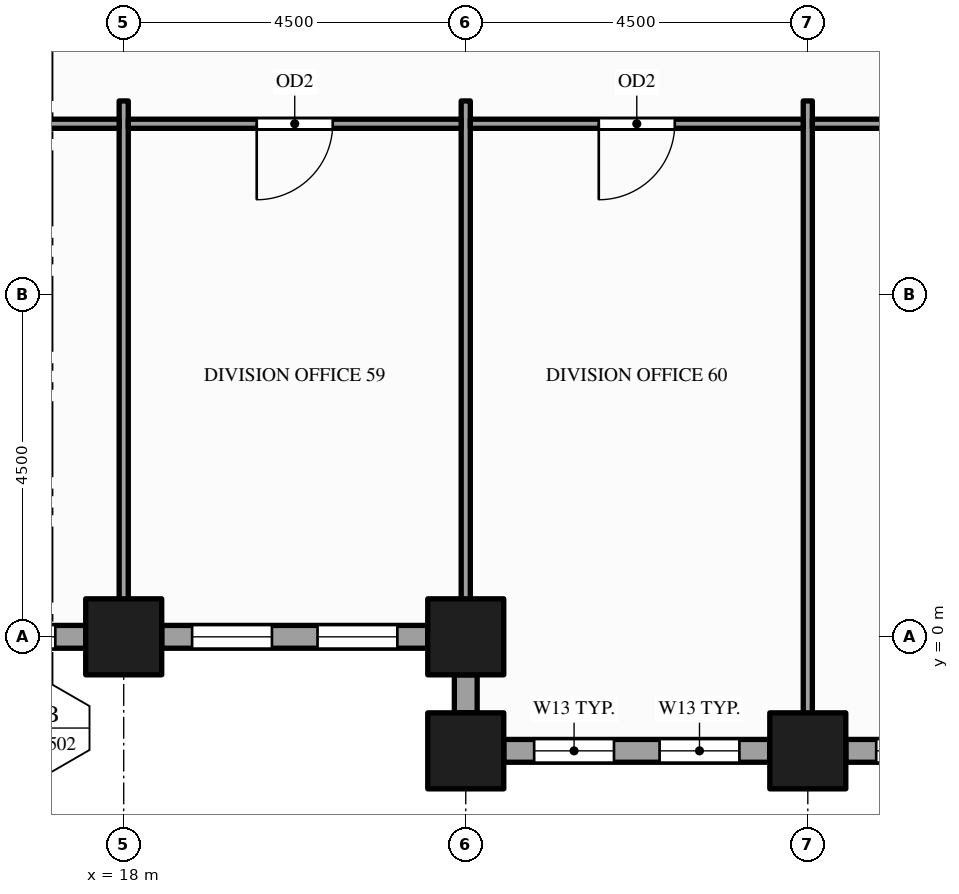
"""IFC4 building model, lengths in metres.
Left out: names, types, materials, properties, quantities, classifications, styles, units other than length and angle.
Written with IfcOpenShell. Run it as: python <this file> out.ifc"""

import sys

from ifc_helpers import new_model, si_unit, direction, frame, frame_2d, origin, origin_2d, place, context, subcontext, project, spatial, rectangle, hollow_rectangle, extrude, element, fill, save


model = new_model("IFC4")
c1 = context("Model", 3, precision=1e-05, world=origin(), true_north=direction((0.0, 1.0)))
c2 = subcontext(c1, "Body", "Model", "MODEL_VIEW")
j1 = project(units=[si_unit("LENGTHUNIT", "METRE"), si_unit("PLANEANGLEUNIT", "RADIAN")], contexts=[c1])
p1 = place(None, origin())
s1 = spatial("IfcSite", under=j1, at=p1, CompositionType="ELEMENT")
p2 = place(p1, origin())
s2 = spatial("IfcBuilding", under=s1, at=p2, CompositionType="ELEMENT")
p3 = place(p2, frame((0.0, 0.0, 103.0)))
s3 = spatial("IfcBuildingStorey", under=s2, at=p3, CompositionType="ELEMENT", Elevation=103.0)
for number, where, z_axis, x_axis in (
    (1, (18.0, 0.0, -0.15), (0.0, 0.0, 1.0), (1.0, 0.0, 0.0)),
    (2, (22.5, -1.5, -0.15), (0.0, 0.0, 1.0), (1.0, 0.0, 0.0)),
    (3, (22.5, 0.0, -0.15), (0.0, 0.0, 1.0), (1.0, 0.0, 0.0)),
    (4, (27.0, -1.5, -0.15), (0.0, 0.0, 1.0), (1.0, 0.0, 0.0)),
):
    element("IfcColumn", number, at=place(p3, frame(where, z_axis=z_axis, x_axis=x_axis)), inside=s3, PredefinedType="COLUMN", context=c2, shape_type="SweptSolid", body=[
        extrude(hollow_rectangle(XDim=1.0, YDim=1.0, WallThickness=0.05, at=origin_2d()), origin(), (0.0, 0.0, 1.0), 4.0),
    ])
p4 = place(p3, frame((23.0, -1.5, 0.0), z_axis=(0.0, 0.0, 1.0), x_axis=(1.0, 0.0, 0.0)))
e5 = element("IfcWall", 5, at=p4, inside=s3, PredefinedType="STANDARD", context=c2, shape_type="SweptSolid", body=[
    extrude(rectangle(XDim=3.5, YDim=0.3, at=frame_2d((1.75, 0.0))), origin(), (0.0, 0.0, 1.0), 3.154),
])
p5 = place(p4, frame((0.4, 0.0, 0.9)))
e6 = element("IfcOpeningElement", 6, at=p5, cuts=e5, PredefinedType="OPENING", context=c2, shape_type="SweptSolid", body=[
    extrude(rectangle(XDim=1.05, YDim=2.0, at=frame_2d((0.525, 1.0))), frame((0.0, 0.16, 0.0), z_axis=(0.0, -1.0, 0.0), x_axis=(1.0, 0.0, 0.0)), (0.0, 0.0, 1.0), 0.32),
])
p6 = place(p4, frame((2.05, 0.0, 0.9)))
e7 = element("IfcOpeningElement", 7, at=p6, cuts=e5, PredefinedType="OPENING", context=c2, shape_type="SweptSolid", body=[
    extrude(rectangle(XDim=1.05, YDim=2.0, at=frame_2d((0.525, 1.0))), frame((0.0, 0.16, 0.0), z_axis=(0.0, -1.0, 0.0), x_axis=(1.0, 0.0, 0.0)), (0.0, 0.0, 1.0), 0.32),
])
p7 = place(p3, frame((27.5, -1.5, 0.0), z_axis=(0.0, 0.0, 1.0), x_axis=(1.0, 0.0, 0.0)))
e8 = element("IfcWall", 8, at=p7, inside=s3, PredefinedType="STANDARD", context=c2, shape_type="SweptSolid", body=[
    extrude(rectangle(XDim=3.5, YDim=0.3, at=frame_2d((1.75, 0.0))), origin(), (0.0, 0.0, 1.0), 3.154),
])
p8 = place(p7, frame((0.4, 0.0, 0.9)))
e9 = element("IfcOpeningElement", 9, at=p8, cuts=e8, PredefinedType="OPENING", context=c2, shape_type="SweptSolid", body=[
    extrude(rectangle(XDim=1.05, YDim=2.0, at=frame_2d((0.525, 1.0))), frame((0.0, 0.16, 0.0), z_axis=(0.0, -1.0, 0.0), x_axis=(1.0, 0.0, 0.0)), (0.0, 0.0, 1.0), 0.32),
])
p9 = place(p7, frame((2.05, 0.0, 0.9)))
e10 = element("IfcOpeningElement", 10, at=p9, cuts=e8, PredefinedType="OPENING", context=c2, shape_type="SweptSolid", body=[
    extrude(rectangle(XDim=1.05, YDim=2.0, at=frame_2d((0.525, 1.0))), frame((0.0, 0.16, 0.0), z_axis=(0.0, -1.0, 0.0), x_axis=(1.0, 0.0, 0.0)), (0.0, 0.0, 1.0), 0.32),
])
p10 = place(p3, frame((14.0, 0.0, 0.0), z_axis=(0.0, 0.0, 1.0), x_axis=(1.0, 0.0, 0.0)))
e11 = element("IfcWall", 11, at=p10, inside=s3, PredefinedType="STANDARD", context=c2, shape_type="SweptSolid", body=[
    extrude(rectangle(XDim=3.5, YDim=0.3, at=frame_2d((1.75, 0.0))), origin(), (0.0, 0.0, 1.0), 3.154),
])
p11 = place(p10, frame((0.4, 0.0, 0.9)))
e12 = element("IfcOpeningElement", 12, at=p11, cuts=e11, PredefinedType="OPENING", context=c2, shape_type="SweptSolid", body=[
    extrude(rectangle(XDim=1.05, YDim=2.0, at=frame_2d((0.525, 1.0))), frame((0.0, 0.16, 0.0), z_axis=(0.0, -1.0, 0.0), x_axis=(1.0, 0.0, 0.0)), (0.0, 0.0, 1.0), 0.32),
])
p12 = place(p10, frame((2.05, 0.0, 0.9)))
e13 = element("IfcOpeningElement", 13, at=p12, cuts=e11, PredefinedType="OPENING", context=c2, shape_type="SweptSolid", body=[
    extrude(rectangle(XDim=1.05, YDim=2.0, at=frame_2d((0.525, 1.0))), frame((0.0, 0.16, 0.0), z_axis=(0.0, -1.0, 0.0), x_axis=(1.0, 0.0, 0.0)), (0.0, 0.0, 1.0), 0.32),
])
p13 = place(p3, frame((18.5, 0.0, 0.0), z_axis=(0.0, 0.0, 1.0), x_axis=(1.0, 0.0, 0.0)))
e14 = element("IfcWall", 14, at=p13, inside=s3, PredefinedType="STANDARD", context=c2, shape_type="SweptSolid", body=[
    extrude(rectangle(XDim=3.5, YDim=0.3, at=frame_2d((1.75, 0.0))), origin(), (0.0, 0.0, 1.0), 3.154),
])
p14 = place(p13, frame((0.4, 0.0, 0.9)))
e15 = element("IfcOpeningElement", 15, at=p14, cuts=e14, PredefinedType="OPENING", context=c2, shape_type="SweptSolid", body=[
    extrude(rectangle(XDim=1.05, YDim=2.0, at=frame_2d((0.525, 1.0))), frame((0.0, 0.16, 0.0), z_axis=(0.0, -1.0, 0.0), x_axis=(1.0, 0.0, 0.0)), (0.0, 0.0, 1.0), 0.32),
])
p15 = place(p13, frame((2.05, 0.0, 0.9)))
e16 = element("IfcOpeningElement", 16, at=p15, cuts=e14, PredefinedType="OPENING", context=c2, shape_type="SweptSolid", body=[
    extrude(rectangle(XDim=1.05, YDim=2.0, at=frame_2d((0.525, 1.0))), frame((0.0, 0.16, 0.0), z_axis=(0.0, -1.0, 0.0), x_axis=(1.0, 0.0, 0.0)), (0.0, 0.0, 1.0), 0.32),
])
p16 = place(p3, frame((22.5, -0.5, 0.0), z_axis=(0.0, 0.0, 1.0), x_axis=(0.0, -1.0, 0.0)))
e17 = element("IfcWall", 17, at=p16, inside=s3, PredefinedType="STANDARD", context=c2, shape_type="SweptSolid", body=[
    extrude(rectangle(XDim=0.5, YDim=0.3, at=frame_2d((0.25, 0.0))), origin(), (0.0, 0.0, 1.0), 3.154),
])
for number, where, z_axis, x_axis in (
    (18, (18.0, 0.15, 0.0), (0.0, 0.0, 1.0), (0.0, 1.0, 0.0)),
    (19, (22.5, 0.15, 0.0), (0.0, 0.0, 1.0), (0.0, 1.0, 0.0)),
):
    element("IfcWall", number, at=place(p3, frame(where, z_axis=z_axis, x_axis=x_axis)), inside=s3, PredefinedType="PARTITIONING", context=c2, shape_type="SweptSolid", body=[
        extrude(rectangle(XDim=6.9, YDim=0.12, at=frame_2d((3.45, 0.0))), origin(), (0.0, 0.0, 1.0), 2.938),
    ])
p17 = place(p3, frame((27.0, -1.35, 0.0), z_axis=(0.0, 0.0, 1.0), x_axis=(0.0, 1.0, 0.0)))
e20 = element("IfcWall", 20, at=p17, inside=s3, PredefinedType="PARTITIONING", context=c2, shape_type="SweptSolid", body=[
    extrude(rectangle(XDim=8.4, YDim=0.12, at=frame_2d((4.2, 0.0))), origin(), (0.0, 0.0, 1.0), 2.938),
])
p18 = place(p3, frame((13.56, 6.75, 0.0), z_axis=(0.0, 0.0, 1.0), x_axis=(1.0, 0.0, 0.0)))
e21 = element("IfcWall", 21, at=p18, inside=s3, PredefinedType="PARTITIONING", context=c2, shape_type="SweptSolid", body=[
    extrude(rectangle(XDim=4.38, YDim=0.12, at=frame_2d((2.19, 0.0))), origin(), (0.0, 0.0, 1.0), 2.938),
])
p19 = place(p18, frame((1.69, 0.0, 0.0)))
e22 = element("IfcOpeningElement", 22, at=p19, cuts=e21, PredefinedType="OPENING", context=c2, shape_type="SweptSolid", body=[
    extrude(rectangle(XDim=1.0, YDim=2.1, at=frame_2d((0.5, 1.05))), frame((0.0, 0.07, 0.0), z_axis=(0.0, -1.0, 0.0), x_axis=(1.0, 0.0, 0.0)), (0.0, 0.0, 1.0), 0.14),
])
p20 = place(p3, frame((18.06, 6.75, 0.0), z_axis=(0.0, 0.0, 1.0), x_axis=(1.0, 0.0, 0.0)))
e23 = element("IfcWall", 23, at=p20, inside=s3, PredefinedType="PARTITIONING", context=c2, shape_type="SweptSolid", body=[
    extrude(rectangle(XDim=4.38, YDim=0.12, at=frame_2d((2.19, 0.0))), origin(), (0.0, 0.0, 1.0), 2.938),
])
p21 = place(p20, frame((1.69, 0.0, 0.0)))
e24 = element("IfcOpeningElement", 24, at=p21, cuts=e23, PredefinedType="OPENING", context=c2, shape_type="SweptSolid", body=[
    extrude(rectangle(XDim=1.0, YDim=2.1, at=frame_2d((0.5, 1.05))), frame((0.0, 0.07, 0.0), z_axis=(0.0, -1.0, 0.0), x_axis=(1.0, 0.0, 0.0)), (0.0, 0.0, 1.0), 0.14),
])
p22 = place(p3, frame((22.56, 6.75, 0.0), z_axis=(0.0, 0.0, 1.0), x_axis=(1.0, 0.0, 0.0)))
e25 = element("IfcWall", 25, at=p22, inside=s3, PredefinedType="PARTITIONING", context=c2, shape_type="SweptSolid", body=[
    extrude(rectangle(XDim=4.38, YDim=0.12, at=frame_2d((2.19, 0.0))), origin(), (0.0, 0.0, 1.0), 2.76),
])
p23 = place(p22, frame((1.69, 0.0, 0.0)))
e26 = element("IfcOpeningElement", 26, at=p23, cuts=e25, PredefinedType="OPENING", context=c2, shape_type="SweptSolid", body=[
    extrude(rectangle(XDim=1.0, YDim=2.1, at=frame_2d((0.5, 1.05))), frame((0.0, 0.07, 0.0), z_axis=(0.0, -1.0, 0.0), x_axis=(1.0, 0.0, 0.0)), (0.0, 0.0, 1.0), 0.14),
])
p24 = place(p3, frame((27.06, 6.75, 0.0), z_axis=(0.0, 0.0, 1.0), x_axis=(1.0, 0.0, 0.0)))
e27 = element("IfcWall", 27, at=p24, inside=s3, PredefinedType="PARTITIONING", context=c2, shape_type="SweptSolid", body=[
    extrude(rectangle(XDim=4.38, YDim=0.12, at=frame_2d((2.19, 0.0))), origin(), (0.0, 0.0, 1.0), 2.938),
])
p25 = place(p24, frame((1.69, 0.0, 0.0)))
e28 = element("IfcOpeningElement", 28, at=p25, cuts=e27, PredefinedType="OPENING", context=c2, shape_type="SweptSolid", body=[
    extrude(rectangle(XDim=1.0, YDim=2.1, at=frame_2d((0.5, 1.05))), frame((0.0, 0.07, 0.0), z_axis=(0.0, -1.0, 0.0), x_axis=(1.0, 0.0, 0.0)), (0.0, 0.0, 1.0), 0.14),
])
p26 = place(p5, origin())
e29 = element("IfcWindow", 29, at=p26, inside=s3, PartitioningType="SINGLE_PANEL", PredefinedType="WINDOW", context=c2, shape_type="SweptSolid", body=[
    extrude(rectangle(XDim=1.05, YDim=2.0, at=frame_2d((0.525, 1.0))), frame((0.0, 0.03, 0.0), z_axis=(0.0, -1.0, 0.0), x_axis=(1.0, 0.0, 0.0)), (0.0, 0.0, 1.0), 0.06),
])
fill(e6, e29)
p27 = place(p6, origin())
e30 = element("IfcWindow", 30, at=p27, inside=s3, PartitioningType="SINGLE_PANEL", PredefinedType="WINDOW", context=c2, shape_type="SweptSolid", body=[
    extrude(rectangle(XDim=1.05, YDim=2.0, at=frame_2d((0.525, 1.0))), frame((0.0, 0.03, 0.0), z_axis=(0.0, -1.0, 0.0), x_axis=(1.0, 0.0, 0.0)), (0.0, 0.0, 1.0), 0.06),
])
fill(e7, e30)
p28 = place(p8, origin())
e31 = element("IfcWindow", 31, at=p28, inside=s3, PartitioningType="SINGLE_PANEL", PredefinedType="WINDOW", context=c2, shape_type="SweptSolid", body=[
    extrude(rectangle(XDim=1.05, YDim=2.0, at=frame_2d((0.525, 1.0))), frame((0.0, 0.03, 0.0), z_axis=(0.0, -1.0, 0.0), x_axis=(1.0, 0.0, 0.0)), (0.0, 0.0, 1.0), 0.06),
])
fill(e9, e31)
p29 = place(p12, origin())
e32 = element("IfcWindow", 32, at=p29, inside=s3, PartitioningType="SINGLE_PANEL", PredefinedType="WINDOW", context=c2, shape_type="SweptSolid", body=[
    extrude(rectangle(XDim=1.05, YDim=2.0, at=frame_2d((0.525, 1.0))), frame((0.0, 0.03, 0.0), z_axis=(0.0, -1.0, 0.0), x_axis=(1.0, 0.0, 0.0)), (0.0, 0.0, 1.0), 0.06),
])
fill(e13, e32)
p30 = place(p14, origin())
e33 = element("IfcWindow", 33, at=p30, inside=s3, PartitioningType="SINGLE_PANEL", PredefinedType="WINDOW", context=c2, shape_type="SweptSolid", body=[
    extrude(rectangle(XDim=1.05, YDim=2.0, at=frame_2d((0.525, 1.0))), frame((0.0, 0.03, 0.0), z_axis=(0.0, -1.0, 0.0), x_axis=(1.0, 0.0, 0.0)), (0.0, 0.0, 1.0), 0.06),
])
fill(e15, e33)
p31 = place(p15, origin())
e34 = element("IfcWindow", 34, at=p31, inside=s3, PartitioningType="SINGLE_PANEL", PredefinedType="WINDOW", context=c2, shape_type="SweptSolid", body=[
    extrude(rectangle(XDim=1.05, YDim=2.0, at=frame_2d((0.525, 1.0))), frame((0.0, 0.03, 0.0), z_axis=(0.0, -1.0, 0.0), x_axis=(1.0, 0.0, 0.0)), (0.0, 0.0, 1.0), 0.06),
])
fill(e16, e34)
p32 = place(p21, origin())
e35 = element("IfcDoor", 35, at=p32, inside=s3, OperationType="SINGLE_SWING_LEFT", PredefinedType="DOOR", context=c2, shape_type="SweptSolid", body=[
    extrude(rectangle(XDim=1.0, YDim=2.1, at=frame_2d((0.5, 1.05))), frame((0.0, 0.025, 0.0), z_axis=(0.0, -1.0, 0.0), x_axis=(1.0, 0.0, 0.0)), (0.0, 0.0, 1.0), 0.05),
])
fill(e24, e35)
p33 = place(p23, origin())
e36 = element("IfcDoor", 36, at=p33, inside=s3, OperationType="SINGLE_SWING_LEFT", PredefinedType="DOOR", context=c2, shape_type="SweptSolid", body=[
    extrude(rectangle(XDim=1.0, YDim=2.1, at=frame_2d((0.5, 1.05))), frame((0.0, 0.025, 0.0), z_axis=(0.0, -1.0, 0.0), x_axis=(1.0, 0.0, 0.0)), (0.0, 0.0, 1.0), 0.05),
])
fill(e26, e36)
save(model, sys.argv[1])
